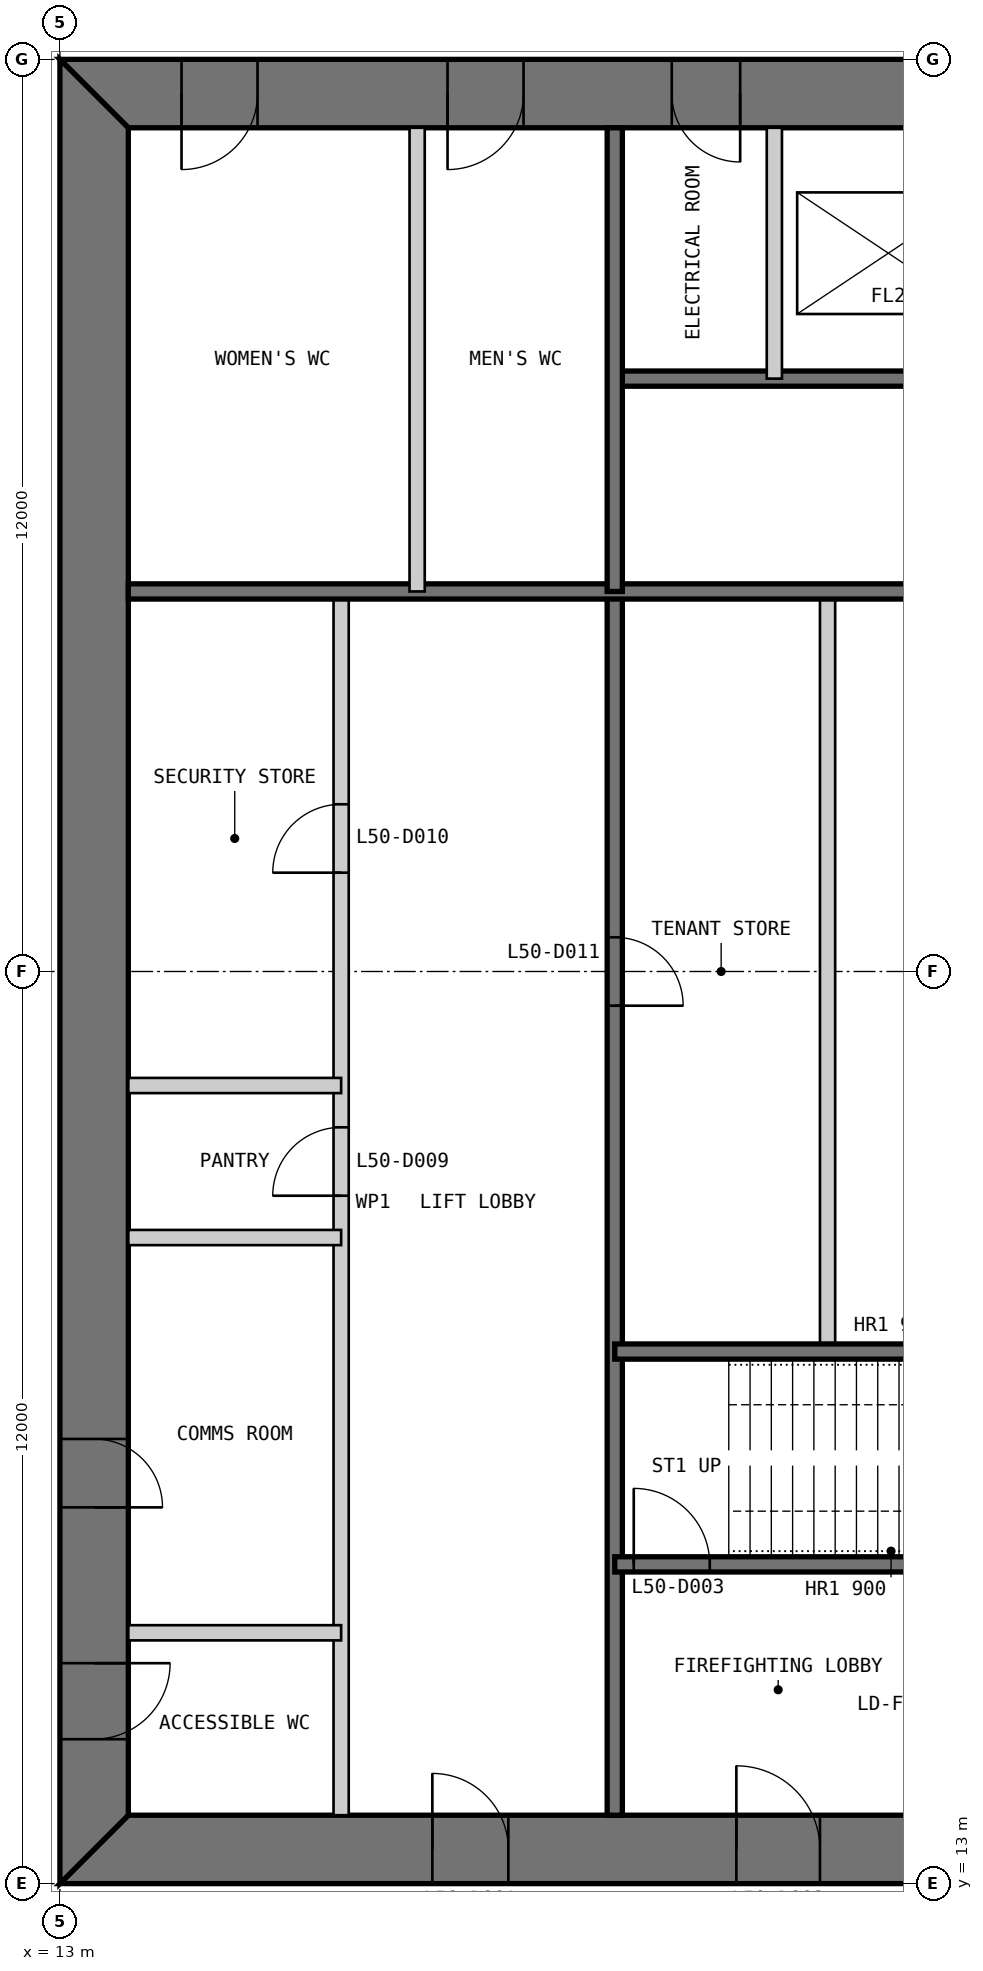
"""IFC4 building model, lengths in metres.
Left out: names, types, materials, properties, quantities, classifications, styles, units other than length and angle.
Written with IfcOpenShell. Run it as: python <this file> out.ifc"""

import sys

from ifc_helpers import new_model, si_unit, direction, frame, frame_2d, origin, place, context, subcontext, project, spatial, polyline, rectangle, outline, extrude, element, fill, save


model = new_model("IFC4")
c1 = context("Model", 3, precision=1e-05, world=origin(), true_north=direction((0.0, 1.0)))
c2 = subcontext(c1, "Body", "Model", "MODEL_VIEW")
j1 = project(units=[si_unit("LENGTHUNIT", "METRE"), si_unit("PLANEANGLEUNIT", "RADIAN")], contexts=[c1])
p1 = place(None, origin())
s1 = spatial("IfcSite", under=j1, at=p1, CompositionType="ELEMENT")
p2 = place(p1, origin())
s2 = spatial("IfcBuilding", under=s1, at=p2, CompositionType="ELEMENT")
p3 = place(p2, frame((0.0, 0.0, 213.8)))
s3 = spatial("IfcBuildingStorey", under=s2, at=p3, CompositionType="ELEMENT", Elevation=213.8)
p4 = place(p3, frame((13.0, 13.45, 0.0), z_axis=(0.0, 0.0, 1.0), x_axis=(1.0, 0.0, 0.0)))
e1 = element("IfcWall", 1, at=p4, inside=s3, PredefinedType="SHEAR", context=c2, shape_type="SweptSolid", body=[
    extrude(outline(polyline([(0.0, -0.45), (24.0, -0.45), (23.1, 0.45), (0.9, 0.45), (0.0, -0.45)])), origin(), (0.0, 0.0, 1.0), 4.0),
])
p5 = place(p4, frame((4.9, 0.0, 0.0)))
e2 = element("IfcOpeningElement", 2, at=p5, cuts=e1, PredefinedType="OPENING", context=c2, shape_type="SweptSolid", body=[
    extrude(rectangle(XDim=1.0, YDim=2.2, at=frame_2d((0.5, 1.1))), frame((0.0, 0.46, 0.0), z_axis=(0.0, -1.0, 0.0), x_axis=(1.0, 0.0, 0.0)), (0.0, 0.0, 1.0), 0.92),
])
p6 = place(p4, frame((8.9, 0.0, 0.0)))
e3 = element("IfcOpeningElement", 3, at=p6, cuts=e1, PredefinedType="OPENING", context=c2, shape_type="SweptSolid", body=[
    extrude(rectangle(XDim=1.1, YDim=2.2, at=frame_2d((0.55, 1.1))), frame((0.0, 0.46, 0.0), z_axis=(0.0, -1.0, 0.0), x_axis=(1.0, 0.0, 0.0)), (0.0, 0.0, 1.0), 0.92),
])
p7 = place(p4, frame((15.05, 0.0, 0.0)))
e4 = element("IfcOpeningElement", 4, at=p7, cuts=e1, PredefinedType="OPENING", context=c2, shape_type="SweptSolid", body=[
    extrude(rectangle(XDim=0.9, YDim=2.2, at=frame_2d((0.45, 1.1))), frame((0.0, 0.46, 0.0), z_axis=(0.0, -1.0, 0.0), x_axis=(1.0, 0.0, 0.0)), (0.0, 0.0, 1.0), 0.92),
])
p8 = place(p4, frame((17.9, 0.0, 0.0)))
e5 = element("IfcOpeningElement", 5, at=p8, cuts=e1, PredefinedType="OPENING", context=c2, shape_type="SweptSolid", body=[
    extrude(rectangle(XDim=1.0, YDim=2.2, at=frame_2d((0.5, 1.1))), frame((0.0, 0.46, 0.0), z_axis=(0.0, -1.0, 0.0), x_axis=(1.0, 0.0, 0.0)), (0.0, 0.0, 1.0), 0.92),
])
p9 = place(p4, frame((21.4, 0.0, 0.0)))
e6 = element("IfcOpeningElement", 6, at=p9, cuts=e1, PredefinedType="OPENING", context=c2, shape_type="SweptSolid", body=[
    extrude(rectangle(XDim=1.0, YDim=2.2, at=frame_2d((0.5, 1.1))), frame((0.0, 0.46, 0.0), z_axis=(0.0, -1.0, 0.0), x_axis=(1.0, 0.0, 0.0)), (0.0, 0.0, 1.0), 0.92),
])
p10 = place(p3, frame((37.0, 36.55, 0.0), z_axis=(0.0, 0.0, 1.0), x_axis=(-1.0, 0.0, 0.0)))
e7 = element("IfcWall", 7, at=p10, inside=s3, PredefinedType="SHEAR", context=c2, shape_type="SweptSolid", body=[
    extrude(outline(polyline([(0.0, -0.45), (24.0, -0.45), (23.1, 0.45), (0.9, 0.45), (0.0, -0.45)])), origin(), (0.0, 0.0, 1.0), 4.0),
])
p11 = place(p10, frame((4.9, 0.0, 0.0)))
e8 = element("IfcOpeningElement", 8, at=p11, cuts=e7, PredefinedType="OPENING", context=c2, shape_type="SweptSolid", body=[
    extrude(rectangle(XDim=1.0, YDim=2.2, at=frame_2d((0.5, 1.1))), frame((0.0, 0.46, 0.0), z_axis=(0.0, -1.0, 0.0), x_axis=(1.0, 0.0, 0.0)), (0.0, 0.0, 1.0), 0.92),
])
p12 = place(p10, frame((8.9, 0.0, 0.0)))
e9 = element("IfcOpeningElement", 9, at=p12, cuts=e7, PredefinedType="OPENING", context=c2, shape_type="SweptSolid", body=[
    extrude(rectangle(XDim=1.1, YDim=2.2, at=frame_2d((0.55, 1.1))), frame((0.0, 0.46, 0.0), z_axis=(0.0, -1.0, 0.0), x_axis=(1.0, 0.0, 0.0)), (0.0, 0.0, 1.0), 0.92),
])
p13 = place(p10, frame((15.05, 0.0, 0.0)))
e10 = element("IfcOpeningElement", 10, at=p13, cuts=e7, PredefinedType="OPENING", context=c2, shape_type="SweptSolid", body=[
    extrude(rectangle(XDim=0.9, YDim=2.2, at=frame_2d((0.45, 1.1))), frame((0.0, 0.46, 0.0), z_axis=(0.0, -1.0, 0.0), x_axis=(1.0, 0.0, 0.0)), (0.0, 0.0, 1.0), 0.92),
])
p14 = place(p10, frame((17.9, 0.0, 0.0)))
e11 = element("IfcOpeningElement", 11, at=p14, cuts=e7, PredefinedType="OPENING", context=c2, shape_type="SweptSolid", body=[
    extrude(rectangle(XDim=1.0, YDim=2.2, at=frame_2d((0.5, 1.1))), frame((0.0, 0.46, 0.0), z_axis=(0.0, -1.0, 0.0), x_axis=(1.0, 0.0, 0.0)), (0.0, 0.0, 1.0), 0.92),
])
p15 = place(p10, frame((21.4, 0.0, 0.0)))
e12 = element("IfcOpeningElement", 12, at=p15, cuts=e7, PredefinedType="OPENING", context=c2, shape_type="SweptSolid", body=[
    extrude(rectangle(XDim=1.0, YDim=2.2, at=frame_2d((0.5, 1.1))), frame((0.0, 0.46, 0.0), z_axis=(0.0, -1.0, 0.0), x_axis=(1.0, 0.0, 0.0)), (0.0, 0.0, 1.0), 0.92),
])
p16 = place(p3, frame((13.45, 36.1, 0.0), z_axis=(0.0, 0.0, 1.0), x_axis=(0.0, -1.0, 0.0)))
e13 = element("IfcWall", 13, at=p16, inside=s3, PredefinedType="SHEAR", context=c2, shape_type="SweptSolid", body=[
    extrude(outline(polyline([(-0.9, -0.45), (23.1, -0.45), (22.2, 0.45), (0.0, 0.45), (-0.9, -0.45)])), origin(), (0.0, 0.0, 1.0), 4.0),
])
p17 = place(p16, frame((20.2, 0.0, 0.0)))
e14 = element("IfcOpeningElement", 14, at=p17, cuts=e13, PredefinedType="OPENING", context=c2, shape_type="SweptSolid", body=[
    extrude(rectangle(XDim=1.0, YDim=2.2, at=frame_2d((0.5, 1.1))), frame((0.0, 0.46, 0.0), z_axis=(0.0, -1.0, 0.0), x_axis=(1.0, 0.0, 0.0)), (0.0, 0.0, 1.0), 0.92),
])
p18 = place(p16, frame((17.25, 0.0, 0.0)))
e15 = element("IfcOpeningElement", 15, at=p18, cuts=e13, PredefinedType="OPENING", context=c2, shape_type="SweptSolid", body=[
    extrude(rectangle(XDim=0.9, YDim=2.2, at=frame_2d((0.45, 1.1))), frame((0.0, 0.46, 0.0), z_axis=(0.0, -1.0, 0.0), x_axis=(1.0, 0.0, 0.0)), (0.0, 0.0, 1.0), 0.92),
])
p19 = place(p3, frame((16.7, 13.9, 0.0), z_axis=(0.0, 0.0, 1.0), x_axis=(0.0, 1.0, 0.0)))
e16 = element("IfcWall", 16, at=p19, inside=s3, PredefinedType="PARTITIONING", context=c2, shape_type="SweptSolid", body=[
    extrude(rectangle(XDim=16.1, YDim=0.2, at=frame_2d((8.05, 0.0))), origin(), (0.0, 0.0, 1.0), 3.8),
])
p20 = place(p19, frame((8.15, 0.0, 0.0)))
e17 = element("IfcOpeningElement", 17, at=p20, cuts=e16, PredefinedType="OPENING", context=c2, shape_type="SweptSolid", body=[
    extrude(rectangle(XDim=0.9, YDim=2.2, at=frame_2d((0.45, 1.1))), frame((0.0, 0.11, 0.0), z_axis=(0.0, -1.0, 0.0), x_axis=(1.0, 0.0, 0.0)), (0.0, 0.0, 1.0), 0.22),
])
p21 = place(p19, frame((12.4, 0.0, 0.0)))
e18 = element("IfcOpeningElement", 18, at=p21, cuts=e16, PredefinedType="OPENING", context=c2, shape_type="SweptSolid", body=[
    extrude(rectangle(XDim=0.9, YDim=2.2, at=frame_2d((0.45, 1.1))), frame((0.0, 0.11, 0.0), z_axis=(0.0, -1.0, 0.0), x_axis=(1.0, 0.0, 0.0)), (0.0, 0.0, 1.0), 0.22),
])
p22 = place(p3, frame((20.3, 13.9, 0.0), z_axis=(0.0, 0.0, 1.0), x_axis=(0.0, 1.0, 0.0)))
e19 = element("IfcWall", 19, at=p22, inside=s3, PredefinedType="SOLIDWALL", context=c2, shape_type="SweptSolid", body=[
    extrude(rectangle(XDim=16.1, YDim=0.2, at=frame_2d((8.05, 0.0))), origin(), (0.0, 0.0, 1.0), 3.8),
])
p23 = place(p22, frame((10.65, 0.0, 0.0)))
e20 = element("IfcOpeningElement", 20, at=p23, cuts=e19, PredefinedType="OPENING", context=c2, shape_type="SweptSolid", body=[
    extrude(rectangle(XDim=0.9, YDim=2.2, at=frame_2d((0.45, 1.1))), frame((0.0, 0.11, 0.0), z_axis=(0.0, -1.0, 0.0), x_axis=(1.0, 0.0, 0.0)), (0.0, 0.0, 1.0), 0.22),
])
p24 = place(p3, frame((23.1, 20.0, 0.0), z_axis=(0.0, 0.0, 1.0), x_axis=(0.0, 1.0, 0.0)))
e21 = element("IfcWall", 21, at=p24, inside=s3, PredefinedType="PARTITIONING", context=c2, shape_type="SweptSolid", body=[
    extrude(rectangle(XDim=10.0, YDim=0.2, at=frame_2d((5.0, 0.0))), origin(), (0.0, 0.0, 1.0), 3.8),
])
p25 = place(p3, frame((20.3, 17.2, 0.0), z_axis=(0.0, 0.0, 1.0), x_axis=(1.0, 0.0, 0.0)))
e22 = element("IfcWall", 22, at=p25, inside=s3, PredefinedType="SOLIDWALL", context=c2, shape_type="SweptSolid", body=[
    extrude(rectangle(XDim=9.4, YDim=0.2, at=frame_2d((4.7, 0.0))), origin(), (0.0, 0.0, 1.0), 3.8),
])
p26 = place(p25, frame((0.25, 0.0, 0.0)))
e23 = element("IfcOpeningElement", 23, at=p26, cuts=e22, PredefinedType="OPENING", context=c2, shape_type="SweptSolid", body=[
    extrude(rectangle(XDim=1.0, YDim=2.2, at=frame_2d((0.5, 1.1))), frame((0.0, 0.11, 0.0), z_axis=(0.0, -1.0, 0.0), x_axis=(1.0, 0.0, 0.0)), (0.0, 0.0, 1.0), 0.22),
])
p27 = place(p3, frame((20.3, 20.0, 0.0), z_axis=(0.0, 0.0, 1.0), x_axis=(1.0, 0.0, 0.0)))
e24 = element("IfcWall", 24, at=p27, inside=s3, PredefinedType="SOLIDWALL", context=c2, shape_type="SweptSolid", body=[
    extrude(rectangle(XDim=15.8, YDim=0.2, at=frame_2d((7.9, 0.0))), origin(), (0.0, 0.0, 1.0), 3.8),
])
for number, where, z_axis, x_axis in (
    (25, (13.9, 16.3, 0.0), (0.0, 0.0, 1.0), (1.0, 0.0, 0.0)),
    (26, (13.9, 21.5, 0.0), (0.0, 0.0, 1.0), (1.0, 0.0, 0.0)),
    (27, (13.9, 23.5, 0.0), (0.0, 0.0, 1.0), (1.0, 0.0, 0.0)),
):
    element("IfcWall", number, at=place(p3, frame(where, z_axis=z_axis, x_axis=x_axis)), inside=s3, PredefinedType="PARTITIONING", context=c2, shape_type="SweptSolid", body=[
        extrude(rectangle(XDim=2.8, YDim=0.2, at=frame_2d((1.4, 0.0))), origin(), (0.0, 0.0, 1.0), 3.8),
    ])
p28 = place(p3, frame((29.7, 32.8, 0.0), z_axis=(0.0, 0.0, 1.0), x_axis=(-1.0, 0.0, 0.0)))
e28 = element("IfcWall", 28, at=p28, inside=s3, PredefinedType="SOLIDWALL", context=c2, shape_type="SweptSolid", body=[
    extrude(rectangle(XDim=9.4, YDim=0.2, at=frame_2d((4.7, 0.0))), origin(), (0.0, 0.0, 1.0), 3.8),
])
p29 = place(p28, frame((0.25, 0.0, 0.0)))
e29 = element("IfcOpeningElement", 29, at=p29, cuts=e28, PredefinedType="OPENING", context=c2, shape_type="SweptSolid", body=[
    extrude(rectangle(XDim=1.0, YDim=2.2, at=frame_2d((0.5, 1.1))), frame((0.0, 0.11, 0.0), z_axis=(0.0, -1.0, 0.0), x_axis=(1.0, 0.0, 0.0)), (0.0, 0.0, 1.0), 0.22),
])
p30 = place(p3, frame((29.7, 30.0, 0.0), z_axis=(0.0, 0.0, 1.0), x_axis=(-1.0, 0.0, 0.0)))
e30 = element("IfcWall", 30, at=p30, inside=s3, PredefinedType="SOLIDWALL", context=c2, shape_type="SweptSolid", body=[
    extrude(rectangle(XDim=15.8, YDim=0.2, at=frame_2d((7.9, 0.0))), origin(), (0.0, 0.0, 1.0), 3.8),
])
p31 = place(p3, frame((22.4, 36.1, 0.0), z_axis=(0.0, 0.0, 1.0), x_axis=(0.0, -1.0, 0.0)))
e31 = element("IfcWall", 31, at=p31, inside=s3, PredefinedType="PARTITIONING", context=c2, shape_type="SweptSolid", body=[
    extrude(rectangle(XDim=3.3, YDim=0.2, at=frame_2d((1.65, 0.0))), origin(), (0.0, 0.0, 1.0), 3.8),
])
p32 = place(p3, frame((20.3, 36.1, 0.0), z_axis=(0.0, 0.0, 1.0), x_axis=(0.0, -1.0, 0.0)))
e32 = element("IfcWall", 32, at=p32, inside=s3, PredefinedType="SOLIDWALL", context=c2, shape_type="SweptSolid", body=[
    extrude(rectangle(XDim=6.1, YDim=0.2, at=frame_2d((3.05, 0.0))), origin(), (0.0, 0.0, 1.0), 3.8),
])
p33 = place(p3, frame((17.7, 36.1, 0.0), z_axis=(0.0, 0.0, 1.0), x_axis=(0.0, -1.0, 0.0)))
e33 = element("IfcWall", 33, at=p33, inside=s3, PredefinedType="PARTITIONING", context=c2, shape_type="SweptSolid", body=[
    extrude(rectangle(XDim=6.1, YDim=0.2, at=frame_2d((3.05, 0.0))), origin(), (0.0, 0.0, 1.0), 3.8),
])
p34 = place(p5, origin())
e34 = element("IfcDoor", 34, at=p34, inside=s3, OperationType="SINGLE_SWING_LEFT", PredefinedType="DOOR", context=c2, shape_type="SweptSolid", body=[
    extrude(rectangle(XDim=1.0, YDim=2.2, at=frame_2d((0.5, 1.1))), frame((0.0, 0.025, 0.0), z_axis=(0.0, -1.0, 0.0), x_axis=(1.0, 0.0, 0.0)), (0.0, 0.0, 1.0), 0.05),
    extrude(outline(polyline([(0.0, 0.0), (0.04, 0.0), (0.04, 2.16), (0.96, 2.16), (0.96, 0.0), (1.0, 0.0), (1.0, 2.2), (0.0, 2.2), (0.0, 0.0)])), frame((0.0, 0.3, 0.0), z_axis=(0.0, -1.0, 0.0), x_axis=(1.0, 0.0, 0.0)), (0.0, 0.0, 1.0), 0.6),
])
fill(e2, e34)
p35 = place(p6, origin())
e35 = element("IfcDoor", 35, at=p35, inside=s3, OperationType="SINGLE_SWING_LEFT", PredefinedType="DOOR", context=c2, shape_type="SweptSolid", body=[
    extrude(rectangle(XDim=1.1, YDim=2.2, at=frame_2d((0.55, 1.1))), frame((0.0, 0.025, 0.0), z_axis=(0.0, -1.0, 0.0), x_axis=(1.0, 0.0, 0.0)), (0.0, 0.0, 1.0), 0.05),
    extrude(outline(polyline([(0.0, 0.0), (0.04, 0.0), (0.04, 2.16), (1.06, 2.16), (1.06, 0.0), (1.1, 0.0), (1.1, 2.2), (0.0, 2.2), (0.0, 0.0)])), frame((0.0, 0.3, 0.0), z_axis=(0.0, -1.0, 0.0), x_axis=(1.0, 0.0, 0.0)), (0.0, 0.0, 1.0), 0.6),
])
fill(e3, e35)
p36 = place(p26, origin())
e36 = element("IfcDoor", 36, at=p36, inside=s3, OperationType="SINGLE_SWING_LEFT", PredefinedType="DOOR", context=c2, shape_type="SweptSolid", body=[
    extrude(rectangle(XDim=1.0, YDim=2.2, at=frame_2d((0.5, 1.1))), frame((0.0, 0.025, 0.0), z_axis=(0.0, -1.0, 0.0), x_axis=(1.0, 0.0, 0.0)), (0.0, 0.0, 1.0), 0.05),
])
fill(e23, e36)
p37 = place(p17, origin())
e37 = element("IfcDoor", 37, at=p37, inside=s3, OperationType="SINGLE_SWING_LEFT", PredefinedType="DOOR", context=c2, shape_type="SweptSolid", body=[
    extrude(rectangle(XDim=1.0, YDim=2.2, at=frame_2d((0.5, 1.1))), frame((0.0, 0.025, 0.0), z_axis=(0.0, -1.0, 0.0), x_axis=(1.0, 0.0, 0.0)), (0.0, 0.0, 1.0), 0.05),
    extrude(outline(polyline([(0.0, 0.0), (0.04, 0.0), (0.04, 2.16), (0.96, 2.16), (0.96, 0.0), (1.0, 0.0), (1.0, 2.2), (0.0, 2.2), (0.0, 0.0)])), frame((0.0, 0.3, 0.0), z_axis=(0.0, -1.0, 0.0), x_axis=(1.0, 0.0, 0.0)), (0.0, 0.0, 1.0), 0.6),
])
fill(e14, e37)
p38 = place(p18, origin())
e38 = element("IfcDoor", 38, at=p38, inside=s3, OperationType="SINGLE_SWING_RIGHT", PredefinedType="DOOR", context=c2, shape_type="SweptSolid", body=[
    extrude(rectangle(XDim=0.9, YDim=2.2, at=frame_2d((0.45, 1.1))), frame((0.0, 0.025, 0.0), z_axis=(0.0, -1.0, 0.0), x_axis=(1.0, 0.0, 0.0)), (0.0, 0.0, 1.0), 0.05),
    extrude(outline(polyline([(0.0, 0.0), (0.04, 0.0), (0.04, 2.16), (0.86, 2.16), (0.86, 0.0), (0.9, 0.0), (0.9, 2.2), (0.0, 2.2), (0.0, 0.0)])), frame((0.0, 0.3, 0.0), z_axis=(0.0, -1.0, 0.0), x_axis=(1.0, 0.0, 0.0)), (0.0, 0.0, 1.0), 0.6),
])
fill(e15, e38)
p39 = place(p20, origin())
e39 = element("IfcDoor", 39, at=p39, inside=s3, OperationType="SINGLE_SWING_LEFT", PredefinedType="DOOR", context=c2, shape_type="SweptSolid", body=[
    extrude(rectangle(XDim=0.9, YDim=2.2, at=frame_2d((0.45, 1.1))), frame((0.0, 0.025, 0.0), z_axis=(0.0, -1.0, 0.0), x_axis=(1.0, 0.0, 0.0)), (0.0, 0.0, 1.0), 0.05),
])
fill(e17, e39)
p40 = place(p21, origin())
e40 = element("IfcDoor", 40, at=p40, inside=s3, OperationType="SINGLE_SWING_LEFT", PredefinedType="DOOR", context=c2, shape_type="SweptSolid", body=[
    extrude(rectangle(XDim=0.9, YDim=2.2, at=frame_2d((0.45, 1.1))), frame((0.0, 0.025, 0.0), z_axis=(0.0, -1.0, 0.0), x_axis=(1.0, 0.0, 0.0)), (0.0, 0.0, 1.0), 0.05),
])
fill(e18, e40)
p41 = place(p23, frame((0.9, 0.0, 0.0), z_axis=(0.0, 0.0, 1.0), x_axis=(-1.0, 0.0, 0.0)))
e41 = element("IfcDoor", 41, at=p41, inside=s3, OperationType="SINGLE_SWING_RIGHT", PredefinedType="DOOR", context=c2, shape_type="SweptSolid", body=[
    extrude(rectangle(XDim=0.9, YDim=2.2, at=frame_2d((0.45, 1.1))), frame((0.0, 0.025, 0.0), z_axis=(0.0, -1.0, 0.0), x_axis=(1.0, 0.0, 0.0)), (0.0, 0.0, 1.0), 0.05),
])
fill(e20, e41)
p42 = place(p13, origin())
e42 = element("IfcDoor", 42, at=p42, inside=s3, OperationType="SINGLE_SWING_LEFT", PredefinedType="DOOR", context=c2, shape_type="SweptSolid", body=[
    extrude(rectangle(XDim=0.9, YDim=2.2, at=frame_2d((0.45, 1.1))), frame((0.0, 0.025, 0.0), z_axis=(0.0, -1.0, 0.0), x_axis=(1.0, 0.0, 0.0)), (0.0, 0.0, 1.0), 0.05),
    extrude(outline(polyline([(0.0, 0.0), (0.04, 0.0), (0.04, 2.16), (0.86, 2.16), (0.86, 0.0), (0.9, 0.0), (0.9, 2.2), (0.0, 2.2), (0.0, 0.0)])), frame((0.0, 0.3, 0.0), z_axis=(0.0, -1.0, 0.0), x_axis=(1.0, 0.0, 0.0)), (0.0, 0.0, 1.0), 0.6),
])
fill(e10, e42)
p43 = place(p14, origin())
e43 = element("IfcDoor", 43, at=p43, inside=s3, OperationType="SINGLE_SWING_RIGHT", PredefinedType="DOOR", context=c2, shape_type="SweptSolid", body=[
    extrude(rectangle(XDim=1.0, YDim=2.2, at=frame_2d((0.5, 1.1))), frame((0.0, 0.025, 0.0), z_axis=(0.0, -1.0, 0.0), x_axis=(1.0, 0.0, 0.0)), (0.0, 0.0, 1.0), 0.05),
    extrude(outline(polyline([(0.0, 0.0), (0.04, 0.0), (0.04, 2.16), (0.96, 2.16), (0.96, 0.0), (1.0, 0.0), (1.0, 2.2), (0.0, 2.2), (0.0, 0.0)])), frame((0.0, 0.3, 0.0), z_axis=(0.0, -1.0, 0.0), x_axis=(1.0, 0.0, 0.0)), (0.0, 0.0, 1.0), 0.6),
])
fill(e11, e43)
p44 = place(p15, origin())
e44 = element("IfcDoor", 44, at=p44, inside=s3, OperationType="SINGLE_SWING_RIGHT", PredefinedType="DOOR", context=c2, shape_type="SweptSolid", body=[
    extrude(rectangle(XDim=1.0, YDim=2.2, at=frame_2d((0.5, 1.1))), frame((0.0, 0.025, 0.0), z_axis=(0.0, -1.0, 0.0), x_axis=(1.0, 0.0, 0.0)), (0.0, 0.0, 1.0), 0.05),
    extrude(outline(polyline([(0.0, 0.0), (0.04, 0.0), (0.04, 2.16), (0.96, 2.16), (0.96, 0.0), (1.0, 0.0), (1.0, 2.2), (0.0, 2.2), (0.0, 0.0)])), frame((0.0, 0.3, 0.0), z_axis=(0.0, -1.0, 0.0), x_axis=(1.0, 0.0, 0.0)), (0.0, 0.0, 1.0), 0.6),
])
fill(e12, e44)
save(model, sys.argv[1])
